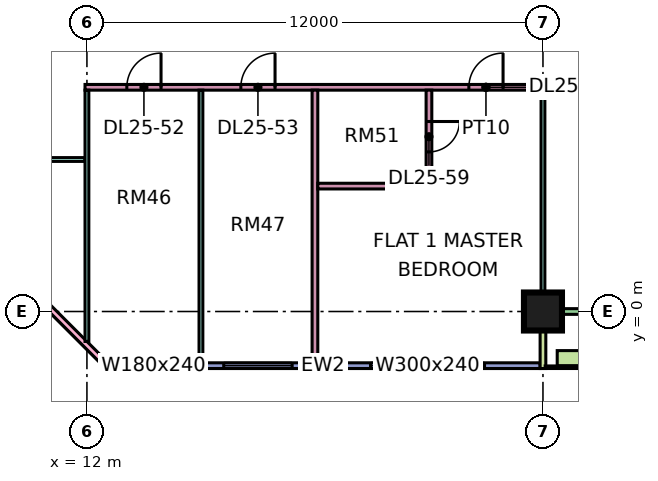
"""IFC4 building model, lengths in metres.
Left out: names, types, materials, properties, quantities, classifications, styles, units other than length and angle.
Written with IfcOpenShell. Run it as: python <this file> out.ifc"""

import sys

from ifc_helpers import new_model, si_unit, direction, frame, frame_2d, origin, origin_2d, place, context, subcontext, project, spatial, rectangle, extrude, element, fill, save


model = new_model("IFC4")
c1 = context("Model", 3, precision=1e-05, world=origin(), true_north=direction((0.0, 1.0)))
c2 = subcontext(c1, "Body", "Model", "MODEL_VIEW")
j1 = project(units=[si_unit("LENGTHUNIT", "METRE"), si_unit("PLANEANGLEUNIT", "RADIAN")], contexts=[c1])
p1 = place(None, origin())
s1 = spatial("IfcSite", under=j1, at=p1, CompositionType="ELEMENT")
p2 = place(p1, origin())
s2 = spatial("IfcBuilding", under=s1, at=p2, CompositionType="ELEMENT")
p3 = place(p2, frame((0.0, 0.0, 110.65)))
s3 = spatial("IfcBuildingStorey", under=s2, at=p3, CompositionType="ELEMENT", Elevation=110.65)
p4 = place(p3, frame((24.0, 0.0, 0.0), z_axis=(0.0, 0.0, 1.0), x_axis=(1.0, 0.0, 0.0)))
e1 = element("IfcColumn", 1, at=p4, inside=s3, PredefinedType="COLUMN", context=c2, shape_type="SweptSolid", body=[
    extrude(rectangle(XDim=1.0, YDim=1.0, at=origin_2d()), origin(), (0.0, 0.0, 1.0), 3.75),
])
p5 = place(p3, frame((-1.447, 12.553, 0.0), z_axis=(0.0, 0.0, 1.0), x_axis=(0.707106781187, -0.707106781187, 0.0)))
e2 = element("IfcWall", 2, at=p5, inside=s3, PredefinedType="SOLIDWALL", context=c2, shape_type="SweptSolid", body=[
    extrude(rectangle(XDim=19.799, YDim=0.15, at=frame_2d((9.899, 0.0))), origin(), (0.0, 0.0, 1.0), 3.35),
])
p6 = place(p5, frame((2.212, 0.0, 0.45)))
e3 = element("IfcOpeningElement", 3, at=p6, cuts=e2, PredefinedType="OPENING", context=c2, shape_type="SweptSolid", body=[
    extrude(rectangle(XDim=3.0, YDim=2.4, at=frame_2d((1.5, 1.2))), frame((0.0, 0.085, 0.0), z_axis=(0.0, -1.0, 0.0), x_axis=(1.0, 0.0, 0.0)), (0.0, 0.0, 1.0), 0.17),
])
p7 = place(p5, frame((10.216, 0.0, 0.45)))
e4 = element("IfcOpeningElement", 4, at=p7, cuts=e2, PredefinedType="OPENING", context=c2, shape_type="SweptSolid", body=[
    extrude(rectangle(XDim=3.0, YDim=2.4, at=frame_2d((1.5, 1.2))), frame((0.0, 0.085, 0.0), z_axis=(0.0, -1.0, 0.0), x_axis=(1.0, 0.0, 0.0)), (0.0, 0.0, 1.0), 0.17),
])
p8 = place(p3, frame((12.5, -1.425, 0.0), z_axis=(0.0, 0.0, 1.0), x_axis=(1.0, 0.0, 0.0)))
e5 = element("IfcWall", 5, at=p8, inside=s3, PredefinedType="SOLIDWALL", context=c2, shape_type="SweptSolid", body=[
    extrude(rectangle(XDim=11.425, YDim=0.15, at=frame_2d((5.712, 0.0))), origin(), (0.0, 0.0, 1.0), 3.35),
])
p9 = place(p8, frame((0.35, 0.0, 0.45)))
e6 = element("IfcOpeningElement", 6, at=p9, cuts=e5, PredefinedType="OPENING", context=c2, shape_type="SweptSolid", body=[
    extrude(rectangle(XDim=1.8, YDim=2.4, at=frame_2d((0.9, 1.2))), frame((0.0, 0.085, 0.0), z_axis=(0.0, -1.0, 0.0), x_axis=(1.0, 0.0, 0.0)), (0.0, 0.0, 1.0), 0.17),
])
p10 = place(p8, frame((3.1, 0.0, 0.45)))
e7 = element("IfcOpeningElement", 7, at=p10, cuts=e5, PredefinedType="OPENING", context=c2, shape_type="SweptSolid", body=[
    extrude(rectangle(XDim=1.8, YDim=2.4, at=frame_2d((0.9, 1.2))), frame((0.0, 0.085, 0.0), z_axis=(0.0, -1.0, 0.0), x_axis=(1.0, 0.0, 0.0)), (0.0, 0.0, 1.0), 0.17),
])
p11 = place(p8, frame((6.962, 0.0, 0.45)))
e8 = element("IfcOpeningElement", 8, at=p11, cuts=e5, PredefinedType="OPENING", context=c2, shape_type="SweptSolid", body=[
    extrude(rectangle(XDim=3.0, YDim=2.4, at=frame_2d((1.5, 1.2))), frame((0.0, 0.085, 0.0), z_axis=(0.0, -1.0, 0.0), x_axis=(1.0, 0.0, 0.0)), (0.0, 0.0, 1.0), 0.17),
])
p12 = place(p3, frame((24.075, 0.0, 0.0), z_axis=(0.0, 0.0, 1.0), x_axis=(1.0, 0.0, 0.0)))
e9 = element("IfcWall", 9, at=p12, inside=s3, PredefinedType="SOLIDWALL", context=c2, shape_type="SweptSolid", body=[
    extrude(rectangle(XDim=11.85, YDim=0.15, at=frame_2d((5.925, 0.0))), origin(), (0.0, 0.0, 1.0), 3.35),
])
p13 = place(p12, frame((3.825, 0.0, 0.0)))
e10 = element("IfcOpeningElement", 10, at=p13, cuts=e9, PredefinedType="OPENING", context=c2, shape_type="SweptSolid", body=[
    extrude(rectangle(XDim=1.8, YDim=2.4, at=frame_2d((0.9, 1.2))), frame((0.0, 0.085, 0.0), z_axis=(0.0, -1.0, 0.0), x_axis=(1.0, 0.0, 0.0)), (0.0, 0.0, 1.0), 0.17),
])
p14 = place(p12, frame((9.525, 0.0, 0.45)))
e11 = element("IfcOpeningElement", 11, at=p14, cuts=e9, PredefinedType="OPENING", context=c2, shape_type="SweptSolid", body=[
    extrude(rectangle(XDim=1.2, YDim=2.4, at=frame_2d((0.6, 1.2))), frame((0.0, 0.085, 0.0), z_axis=(0.0, -1.0, 0.0), x_axis=(1.0, 0.0, 0.0)), (0.0, 0.0, 1.0), 0.17),
])
p15 = place(p3, frame((24.0, -1.5, 0.0), z_axis=(0.0, 0.0, 1.0), x_axis=(0.0, 1.0, 0.0)))
e12 = element("IfcWall", 12, at=p15, inside=s3, PredefinedType="SOLIDWALL", context=c2, shape_type="SweptSolid", body=[
    extrude(rectangle(XDim=1.5, YDim=0.15, at=frame_2d((0.75, 0.0))), origin(), (0.0, 0.0, 1.0), 3.35),
])
p16 = place(p3, frame((24.375, -1.229, 0.0), z_axis=(0.0, 0.0, 1.0), x_axis=(1.0, 0.0, 0.0)))
e13 = element("IfcWall", 13, at=p16, inside=s3, PredefinedType="SOLIDWALL", context=c2, shape_type="SweptSolid", body=[
    extrude(rectangle(XDim=11.25, YDim=0.4, at=frame_2d((5.625, 0.0))), origin(), (0.0, 0.0, 1.0), 0.7),
])
p17 = place(p3, frame((9.05, 4.0, 0.0), z_axis=(0.0, 0.0, 1.0), x_axis=(1.0, 0.0, 0.0)))
e14 = element("IfcWall", 14, at=p17, inside=s3, PredefinedType="PARTITIONING", context=c2, shape_type="SweptSolid", body=[
    extrude(rectangle(XDim=2.9, YDim=0.1, at=frame_2d((1.45, 0.0))), origin(), (0.0, 0.0, 1.0), 3.35),
])
p18 = place(p3, frame((11.95, 5.9, 0.0), z_axis=(0.0, 0.0, 1.0), x_axis=(1.0, 0.0, 0.0)))
e15 = element("IfcWall", 15, at=p18, inside=s3, PredefinedType="PARTITIONING", context=c2, shape_type="SweptSolid", body=[
    extrude(rectangle(XDim=21.1, YDim=0.15, at=frame_2d((10.55, 0.0))), origin(), (0.0, 0.0, 1.0), 3.35),
])
p19 = place(p18, frame((1.1, 0.0, 0.0)))
e16 = element("IfcOpeningElement", 16, at=p19, cuts=e15, PredefinedType="OPENING", context=c2, shape_type="SweptSolid", body=[
    extrude(rectangle(XDim=0.9, YDim=2.1, at=frame_2d((0.45, 1.05))), frame((0.0, 0.085, 0.0), z_axis=(0.0, -1.0, 0.0), x_axis=(1.0, 0.0, 0.0)), (0.0, 0.0, 1.0), 0.17),
])
p20 = place(p18, frame((4.1, 0.0, 0.0)))
e17 = element("IfcOpeningElement", 17, at=p20, cuts=e15, PredefinedType="OPENING", context=c2, shape_type="SweptSolid", body=[
    extrude(rectangle(XDim=0.9, YDim=2.1, at=frame_2d((0.45, 1.05))), frame((0.0, 0.085, 0.0), z_axis=(0.0, -1.0, 0.0), x_axis=(1.0, 0.0, 0.0)), (0.0, 0.0, 1.0), 0.17),
])
p21 = place(p18, frame((10.1, 0.0, 0.0)))
e18 = element("IfcOpeningElement", 18, at=p21, cuts=e15, PredefinedType="OPENING", context=c2, shape_type="SweptSolid", body=[
    extrude(rectangle(XDim=0.9, YDim=2.1, at=frame_2d((0.45, 1.05))), frame((0.0, 0.085, 0.0), z_axis=(0.0, -1.0, 0.0), x_axis=(1.0, 0.0, 0.0)), (0.0, 0.0, 1.0), 0.17),
])
p22 = place(p18, frame((16.1, 0.0, 0.0)))
e19 = element("IfcOpeningElement", 19, at=p22, cuts=e15, PredefinedType="OPENING", context=c2, shape_type="SweptSolid", body=[
    extrude(rectangle(XDim=0.9, YDim=2.1, at=frame_2d((0.45, 1.05))), frame((0.0, 0.085, 0.0), z_axis=(0.0, -1.0, 0.0), x_axis=(1.0, 0.0, 0.0)), (0.0, 0.0, 1.0), 0.17),
])
p23 = place(p3, frame((12.0, -0.788, 0.0), z_axis=(0.0, 0.0, 1.0), x_axis=(0.0, 1.0, 0.0)))
e20 = element("IfcWall", 20, at=p23, inside=s3, PredefinedType="PARTITIONING", context=c2, shape_type="SweptSolid", body=[
    extrude(rectangle(XDim=6.613, YDim=0.1, at=frame_2d((3.306, 0.0))), origin(), (0.0, 0.0, 1.0), 3.35),
])
p24 = place(p3, frame((15.0, -1.351, 0.0), z_axis=(0.0, 0.0, 1.0), x_axis=(0.0, 1.0, 0.0)))
e21 = element("IfcWall", 21, at=p24, inside=s3, PredefinedType="PARTITIONING", context=c2, shape_type="SweptSolid", body=[
    extrude(rectangle(XDim=7.176, YDim=0.1, at=frame_2d((3.588, 0.0))), origin(), (0.0, 0.0, 1.0), 3.35),
])
p25 = place(p3, frame((18.0, -1.351, 0.0), z_axis=(0.0, 0.0, 1.0), x_axis=(0.0, 1.0, 0.0)))
e22 = element("IfcWall", 22, at=p25, inside=s3, PredefinedType="PARTITIONING", context=c2, shape_type="SweptSolid", body=[
    extrude(rectangle(XDim=7.176, YDim=0.15, at=frame_2d((3.588, 0.0))), origin(), (0.0, 0.0, 1.0), 3.35),
])
p26 = place(p3, frame((18.075, 3.3, 0.0), z_axis=(0.0, 0.0, 1.0), x_axis=(1.0, 0.0, 0.0)))
e23 = element("IfcWall", 23, at=p26, inside=s3, PredefinedType="PARTITIONING", context=c2, shape_type="SweptSolid", body=[
    extrude(rectangle(XDim=3.0, YDim=0.15, at=frame_2d((1.5, 0.0))), origin(), (0.0, 0.0, 1.0), 3.35),
])
p27 = place(p3, frame((21.0, 3.375, 0.0), z_axis=(0.0, 0.0, 1.0), x_axis=(0.0, 1.0, 0.0)))
e24 = element("IfcWall", 24, at=p27, inside=s3, PredefinedType="PARTITIONING", context=c2, shape_type="SweptSolid", body=[
    extrude(rectangle(XDim=2.45, YDim=0.15, at=frame_2d((1.225, 0.0))), origin(), (0.0, 0.0, 1.0), 3.35),
])
p28 = place(p27, frame((0.825, 0.0, 0.0)))
e25 = element("IfcOpeningElement", 25, at=p28, cuts=e24, PredefinedType="OPENING", context=c2, shape_type="SweptSolid", body=[
    extrude(rectangle(XDim=0.8, YDim=2.1, at=frame_2d((0.4, 1.05))), frame((0.0, 0.085, 0.0), z_axis=(0.0, -1.0, 0.0), x_axis=(1.0, 0.0, 0.0)), (0.0, 0.0, 1.0), 0.17),
])
p29 = place(p3, frame((24.0, 0.0, 0.0), z_axis=(0.0, 0.0, 1.0), x_axis=(0.0, 1.0, 0.0)))
e26 = element("IfcWall", 26, at=p29, inside=s3, PredefinedType="PARTITIONING", context=c2, shape_type="SweptSolid", body=[
    extrude(rectangle(XDim=5.825, YDim=0.1, at=frame_2d((2.913, 0.0))), origin(), (0.0, 0.0, 1.0), 3.35),
])
p30 = place(p9, origin())
e27 = element("IfcWindow", 27, at=p30, inside=s3, PartitioningType="SINGLE_PANEL", PredefinedType="WINDOW", context=c2, shape_type="SweptSolid", body=[
    extrude(rectangle(XDim=1.8, YDim=2.4, at=frame_2d((0.9, 1.2))), frame((0.0, 0.03, 0.0), z_axis=(0.0, -1.0, 0.0), x_axis=(1.0, 0.0, 0.0)), (0.0, 0.0, 1.0), 0.06),
])
fill(e6, e27)
p31 = place(p10, origin())
e28 = element("IfcWindow", 28, at=p31, inside=s3, PartitioningType="SINGLE_PANEL", PredefinedType="WINDOW", context=c2, shape_type="SweptSolid", body=[
    extrude(rectangle(XDim=1.8, YDim=2.4, at=frame_2d((0.9, 1.2))), frame((0.0, 0.03, 0.0), z_axis=(0.0, -1.0, 0.0), x_axis=(1.0, 0.0, 0.0)), (0.0, 0.0, 1.0), 0.06),
])
fill(e7, e28)
p32 = place(p11, origin())
e29 = element("IfcWindow", 29, at=p32, inside=s3, PartitioningType="SINGLE_PANEL", PredefinedType="WINDOW", context=c2, shape_type="SweptSolid", body=[
    extrude(rectangle(XDim=3.0, YDim=2.4, at=frame_2d((1.5, 1.2))), frame((0.0, 0.03, 0.0), z_axis=(0.0, -1.0, 0.0), x_axis=(1.0, 0.0, 0.0)), (0.0, 0.0, 1.0), 0.06),
])
fill(e8, e29)
p33 = place(p19, frame((0.9, 0.0, 0.0), z_axis=(0.0, 0.0, 1.0), x_axis=(-1.0, 0.0, 0.0)))
e30 = element("IfcDoor", 30, at=p33, inside=s3, OperationType="SINGLE_SWING_RIGHT", PredefinedType="DOOR", context=c2, shape_type="SweptSolid", body=[
    extrude(rectangle(XDim=0.9, YDim=2.1, at=frame_2d((0.45, 1.05))), frame((0.0, 0.025, 0.0), z_axis=(0.0, -1.0, 0.0), x_axis=(1.0, 0.0, 0.0)), (0.0, 0.0, 1.0), 0.05),
])
fill(e16, e30)
p34 = place(p20, frame((0.9, 0.0, 0.0), z_axis=(0.0, 0.0, 1.0), x_axis=(-1.0, 0.0, 0.0)))
e31 = element("IfcDoor", 31, at=p34, inside=s3, OperationType="SINGLE_SWING_RIGHT", PredefinedType="DOOR", context=c2, shape_type="SweptSolid", body=[
    extrude(rectangle(XDim=0.9, YDim=2.1, at=frame_2d((0.45, 1.05))), frame((0.0, 0.025, 0.0), z_axis=(0.0, -1.0, 0.0), x_axis=(1.0, 0.0, 0.0)), (0.0, 0.0, 1.0), 0.05),
])
fill(e17, e31)
p35 = place(p21, frame((0.9, 0.0, 0.0), z_axis=(0.0, 0.0, 1.0), x_axis=(-1.0, 0.0, 0.0)))
e32 = element("IfcDoor", 32, at=p35, inside=s3, OperationType="SINGLE_SWING_RIGHT", PredefinedType="DOOR", context=c2, shape_type="SweptSolid", body=[
    extrude(rectangle(XDim=0.9, YDim=2.1, at=frame_2d((0.45, 1.05))), frame((0.0, 0.025, 0.0), z_axis=(0.0, -1.0, 0.0), x_axis=(1.0, 0.0, 0.0)), (0.0, 0.0, 1.0), 0.05),
])
fill(e18, e32)
p36 = place(p28, origin())
e33 = element("IfcDoor", 33, at=p36, inside=s3, OperationType="SINGLE_SWING_RIGHT", PredefinedType="DOOR", context=c2, shape_type="SweptSolid", body=[
    extrude(rectangle(XDim=0.8, YDim=2.1, at=frame_2d((0.4, 1.05))), frame((0.0, 0.025, 0.0), z_axis=(0.0, -1.0, 0.0), x_axis=(1.0, 0.0, 0.0)), (0.0, 0.0, 1.0), 0.05),
])
fill(e25, e33)
save(model, sys.argv[1])
